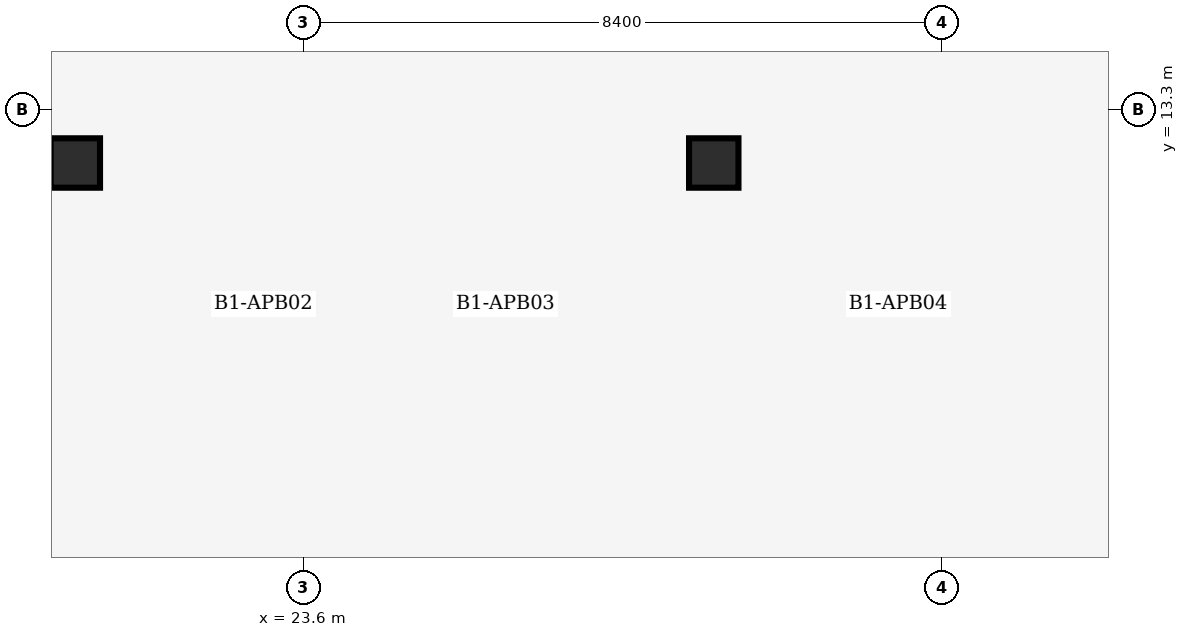
"""IFC4 building model, lengths in metres.
Left out: names, types, materials, properties, quantities, classifications, styles, units other than length and angle.
Written with IfcOpenShell. Run it as: python <this file> out.ifc"""

import sys

from ifc_helpers import new_model, si_unit, direction, frame, origin, origin_2d, place, context, subcontext, project, spatial, rectangle, extrude, element, save


model = new_model("IFC4")
c1 = context("Model", 3, precision=1e-05, world=origin(), true_north=direction((0.0, 1.0)))
c2 = subcontext(c1, "Body", "Model", "MODEL_VIEW")
j1 = project(units=[si_unit("LENGTHUNIT", "METRE"), si_unit("PLANEANGLEUNIT", "RADIAN")], contexts=[c1])
p1 = place(None, origin())
s1 = spatial("IfcSite", under=j1, at=p1, CompositionType="ELEMENT")
p2 = place(p1, origin())
s2 = spatial("IfcBuilding", under=s1, at=p2, CompositionType="ELEMENT")
p3 = place(p2, frame((0.0, 0.0, -4.8)))
s3 = spatial("IfcBuildingStorey", under=s2, at=p3, CompositionType="ELEMENT", Elevation=-4.8)
for number, where, z_axis, x_axis in (
    (1, (20.6, 12.6, 0.0), (0.0, 0.0, 1.0), (1.0, 0.0, 0.0)),
    (2, (29.0, 12.6, 0.0), (0.0, 0.0, 1.0), (1.0, 0.0, 0.0)),
):
    element("IfcColumn", number, at=place(p3, frame(where, z_axis=z_axis, x_axis=x_axis)), inside=s3, PredefinedType="COLUMN", context=c2, shape_type="SweptSolid", body=[
        extrude(rectangle(XDim=0.65, YDim=0.65, at=origin_2d()), origin(), (0.0, 0.0, 1.0), 4.8),
    ])
save(model, sys.argv[1])
